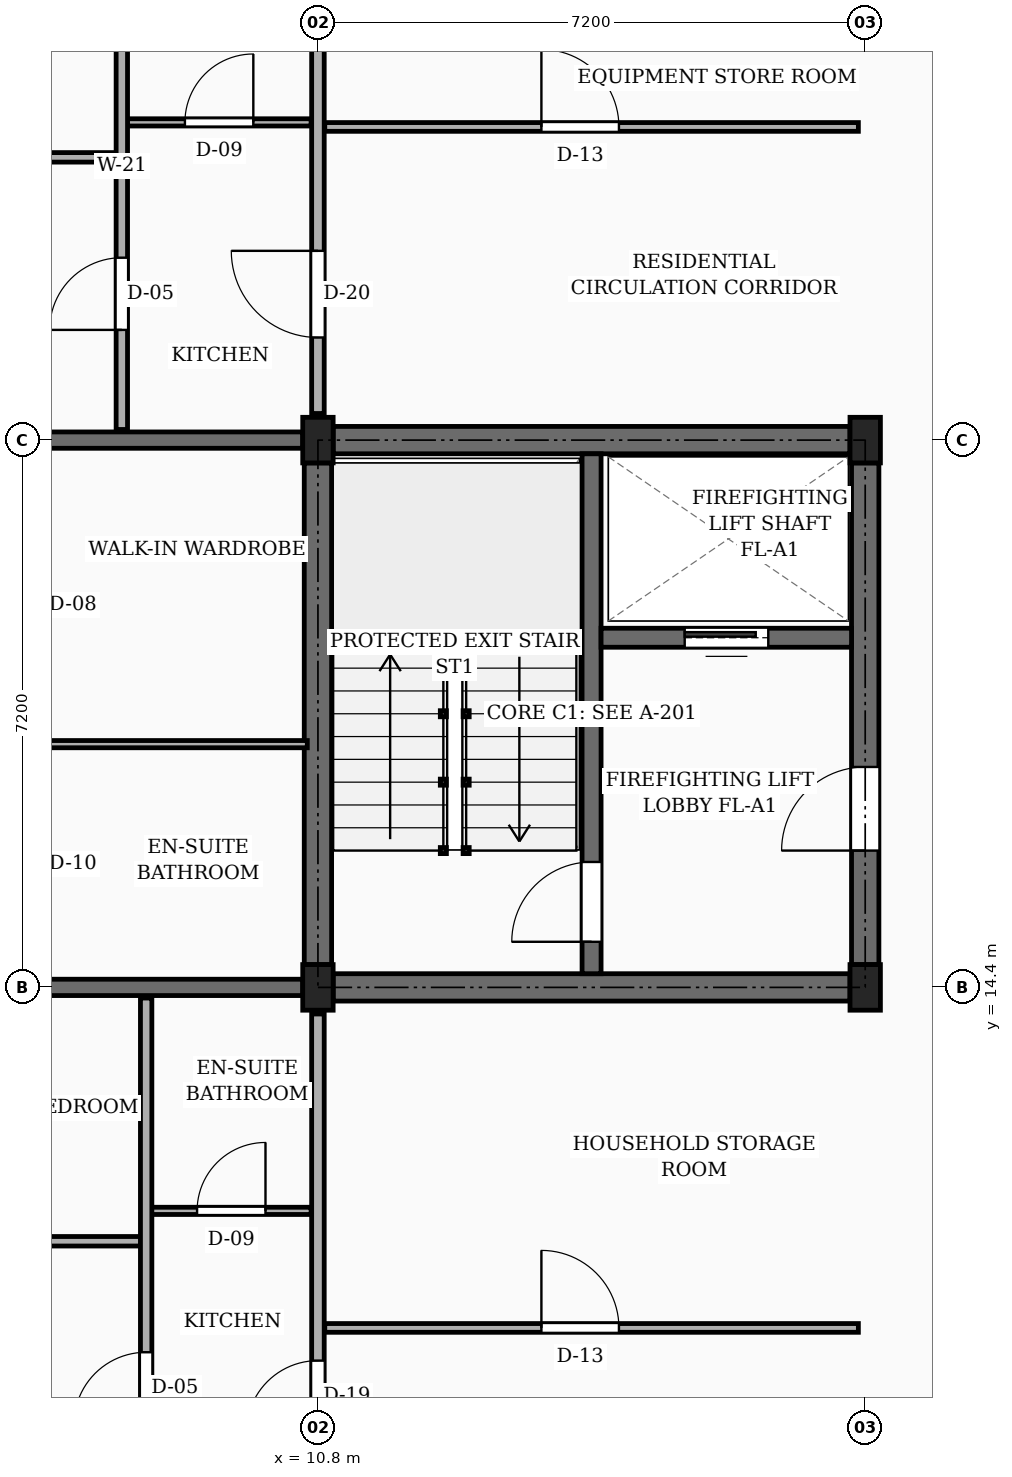
"""IFC4 building model, lengths in metres.
Left out: names, types, materials, properties, quantities, classifications, styles, units other than length and angle.
Written with IfcOpenShell. Run it as: python <this file> out.ifc"""

import sys

from ifc_helpers import new_model, si_unit, direction, frame, frame_2d, origin, origin_2d, place, context, subcontext, project, spatial, rectangle, extrude, element, fill, save


model = new_model("IFC4")
c1 = context("Model", 3, precision=1e-05, world=origin(), true_north=direction((0.0, 1.0)))
c2 = subcontext(c1, "Body", "Model", "MODEL_VIEW")
j1 = project(units=[si_unit("LENGTHUNIT", "METRE"), si_unit("PLANEANGLEUNIT", "RADIAN")], contexts=[c1])
p1 = place(None, origin())
s1 = spatial("IfcSite", under=j1, at=p1, CompositionType="ELEMENT")
p2 = place(p1, origin())
s2 = spatial("IfcBuilding", under=s1, at=p2, CompositionType="ELEMENT")
p3 = place(p2, frame((0.0, 0.0, 32.85)))
s3 = spatial("IfcBuildingStorey", under=s2, at=p3, CompositionType="ELEMENT", Elevation=32.85)
for number, where, z_axis, x_axis in (
    (1, (10.8, 14.4, 0.0), (0.0, 0.0, 1.0), (1.0, 0.0, 0.0)),
    (2, (10.8, 21.6, 0.0), (0.0, 0.0, 1.0), (1.0, 0.0, 0.0)),
    (3, (18.0, 14.4, 0.0), (0.0, 0.0, 1.0), (1.0, 0.0, 0.0)),
    (4, (18.0, 21.6, 0.0), (0.0, 0.0, 1.0), (1.0, 0.0, 0.0)),
):
    element("IfcColumn", number, at=place(p3, frame(where, z_axis=z_axis, x_axis=x_axis)), inside=s3, PredefinedType="COLUMN", context=c2, shape_type="SweptSolid", body=[
        extrude(rectangle(XDim=0.4, YDim=0.6, at=origin_2d()), origin(), (0.0, 0.0, 1.0), 3.15),
    ])
p4 = place(p3, frame((3.85, 14.4, 0.0), z_axis=(0.0, 0.0, 1.0), x_axis=(1.0, 0.0, 0.0)))
e5 = element("IfcWall", 5, at=p4, inside=s3, PredefinedType="SOLIDWALL", context=c2, shape_type="SweptSolid", body=[
    extrude(rectangle(XDim=6.75, YDim=0.215, at=frame_2d((3.375, 0.0))), origin(), (0.0, 0.0, 1.0), 2.17),
])
p5 = place(p4, frame((1.35, 0.0, 0.0)))
e6 = element("IfcOpeningElement", 6, at=p5, cuts=e5, PredefinedType="OPENING", context=c2, shape_type="SweptSolid", body=[
    extrude(rectangle(XDim=0.98, YDim=2.12, at=frame_2d((0.49, 1.06))), frame((0.0, 0.118, 0.0), z_axis=(0.0, -1.0, 0.0), x_axis=(1.0, 0.0, 0.0)), (0.0, 0.0, 1.0), 0.235),
])
p6 = place(p3, frame((3.85, 21.6, 0.0), z_axis=(0.0, 0.0, 1.0), x_axis=(1.0, 0.0, 0.0)))
e7 = element("IfcWall", 7, at=p6, inside=s3, PredefinedType="SOLIDWALL", context=c2, shape_type="SweptSolid", body=[
    extrude(rectangle(XDim=6.75, YDim=0.215, at=frame_2d((3.375, 0.0))), origin(), (0.0, 0.0, 1.0), 2.17),
])
p7 = place(p3, frame((10.8, 14.7, 0.0), z_axis=(0.0, 0.0, 1.0), x_axis=(0.0, 1.0, 0.0)))
e8 = element("IfcWall", 8, at=p7, inside=s3, PredefinedType="SHEAR", context=c2, shape_type="SweptSolid", body=[
    extrude(rectangle(XDim=6.6, YDim=0.36, at=frame_2d((3.3, 0.0))), origin(), (0.0, 0.0, 1.0), 2.87),
])
p8 = place(p3, frame((11.0, 21.6, 0.0), z_axis=(0.0, 0.0, 1.0), x_axis=(1.0, 0.0, 0.0)))
e9 = element("IfcWall", 9, at=p8, inside=s3, PredefinedType="SHEAR", context=c2, shape_type="SweptSolid", body=[
    extrude(rectangle(XDim=6.8, YDim=0.36, at=frame_2d((3.4, 0.0))), origin(), (0.0, 0.0, 1.0), 2.87),
])
p9 = place(p3, frame((18.0, 14.7, 0.0), z_axis=(0.0, 0.0, 1.0), x_axis=(0.0, 1.0, 0.0)))
e10 = element("IfcWall", 10, at=p9, inside=s3, PredefinedType="SHEAR", context=c2, shape_type="SweptSolid", body=[
    extrude(rectangle(XDim=6.6, YDim=0.36, at=frame_2d((3.3, 0.0))), origin(), (0.0, 0.0, 1.0), 2.87),
])
p10 = place(p9, frame((1.5, 0.0, 0.0)))
e11 = element("IfcOpeningElement", 11, at=p10, cuts=e10, PredefinedType="OPENING", context=c2, shape_type="SweptSolid", body=[
    extrude(rectangle(XDim=1.1, YDim=2.15, at=frame_2d((0.55, 1.075))), frame((0.0, 0.19, 0.0), z_axis=(0.0, -1.0, 0.0), x_axis=(1.0, 0.0, 0.0)), (0.0, 0.0, 1.0), 0.38),
])
p11 = place(p3, frame((11.0, 14.4, 0.0), z_axis=(0.0, 0.0, 1.0), x_axis=(1.0, 0.0, 0.0)))
e12 = element("IfcWall", 12, at=p11, inside=s3, PredefinedType="SHEAR", context=c2, shape_type="SweptSolid", body=[
    extrude(rectangle(XDim=6.8, YDim=0.36, at=frame_2d((3.4, 0.0))), origin(), (0.0, 0.0, 1.0), 2.87),
])
p12 = place(p3, frame((14.4, 14.58, 0.0), z_axis=(0.0, 0.0, 1.0), x_axis=(0.0, 1.0, 0.0)))
e13 = element("IfcWall", 13, at=p12, inside=s3, PredefinedType="SHEAR", context=c2, shape_type="SweptSolid", body=[
    extrude(rectangle(XDim=6.84, YDim=0.25, at=frame_2d((3.42, 0.0))), origin(), (0.0, 0.0, 1.0), 2.87),
])
p13 = place(p12, frame((0.42, 0.0, 0.0)))
e14 = element("IfcOpeningElement", 14, at=p13, cuts=e13, PredefinedType="OPENING", context=c2, shape_type="SweptSolid", body=[
    extrude(rectangle(XDim=1.05, YDim=2.15, at=frame_2d((0.525, 1.075))), frame((0.0, 0.135, 0.0), z_axis=(0.0, -1.0, 0.0), x_axis=(1.0, 0.0, 0.0)), (0.0, 0.0, 1.0), 0.27),
])
p14 = place(p3, frame((14.525, 19.0, 0.0), z_axis=(0.0, 0.0, 1.0), x_axis=(1.0, 0.0, 0.0)))
e15 = element("IfcWall", 15, at=p14, inside=s3, PredefinedType="SHEAR", context=c2, shape_type="SweptSolid", body=[
    extrude(rectangle(XDim=3.295, YDim=0.25, at=frame_2d((1.647, 0.0))), origin(), (0.0, 0.0, 1.0), 2.87),
])
p15 = place(p14, frame((1.1, 0.0, 0.0)))
e16 = element("IfcOpeningElement", 16, at=p15, cuts=e15, PredefinedType="OPENING", context=c2, shape_type="SweptSolid", body=[
    extrude(rectangle(XDim=1.1, YDim=2.2, at=frame_2d((0.55, 1.1))), frame((0.0, 0.135, 0.0), z_axis=(0.0, -1.0, 0.0), x_axis=(1.0, 0.0, 0.0)), (0.0, 0.0, 1.0), 0.27),
])
p16 = place(p3, frame((10.8, 7.55, 0.0), z_axis=(0.0, 0.0, 1.0), x_axis=(0.0, 1.0, 0.0)))
e17 = element("IfcWall", 17, at=p16, inside=s3, PredefinedType="PARTITIONING", context=c2, shape_type="SweptSolid", body=[
    extrude(rectangle(XDim=6.5, YDim=0.165, at=frame_2d((3.25, 0.0))), origin(), (0.0, 0.0, 1.0), 2.305),
])
p17 = place(p16, frame((1.0, 0.0, 0.0)))
e18 = element("IfcOpeningElement", 18, at=p17, cuts=e17, PredefinedType="OPENING", context=c2, shape_type="SweptSolid", body=[
    extrude(rectangle(XDim=0.94, YDim=2.12, at=frame_2d((0.47, 1.06))), frame((0.0, 0.093, 0.0), z_axis=(0.0, -1.0, 0.0), x_axis=(1.0, 0.0, 0.0)), (0.0, 0.0, 1.0), 0.185),
])
p18 = place(p3, frame((10.8, 21.95, 0.0), z_axis=(0.0, 0.0, 1.0), x_axis=(0.0, 1.0, 0.0)))
e19 = element("IfcWall", 19, at=p18, inside=s3, PredefinedType="PARTITIONING", context=c2, shape_type="SweptSolid", body=[
    extrude(rectangle(XDim=6.5, YDim=0.165, at=frame_2d((3.25, 0.0))), origin(), (0.0, 0.0, 1.0), 2.305),
])
p19 = place(p18, frame((1.0, 0.0, 0.0)))
e20 = element("IfcOpeningElement", 20, at=p19, cuts=e19, PredefinedType="OPENING", context=c2, shape_type="SweptSolid", body=[
    extrude(rectangle(XDim=1.14, YDim=2.18, at=frame_2d((0.57, 1.09))), frame((0.0, 0.093, 0.0), z_axis=(0.0, -1.0, 0.0), x_axis=(1.0, 0.0, 0.0)), (0.0, 0.0, 1.0), 0.185),
])
p20 = place(p3, frame((10.89, 9.92, 0.0), z_axis=(0.0, 0.0, 1.0), x_axis=(1.0, 0.0, 0.0)))
e21 = element("IfcWall", 21, at=p20, inside=s3, PredefinedType="PARTITIONING", context=c2, shape_type="SweptSolid", body=[
    extrude(rectangle(XDim=7.02, YDim=0.115, at=frame_2d((3.51, 0.0))), origin(), (0.0, 0.0, 1.0), 2.305),
])
p21 = place(p20, frame((2.85, 0.0, 0.0)))
e22 = element("IfcOpeningElement", 22, at=p21, cuts=e21, PredefinedType="OPENING", context=c2, shape_type="SweptSolid", body=[
    extrude(rectangle(XDim=1.02, YDim=2.15, at=frame_2d((0.51, 1.075))), frame((0.0, 0.067, 0.0), z_axis=(0.0, -1.0, 0.0), x_axis=(1.0, 0.0, 0.0)), (0.0, 0.0, 1.0), 0.135),
])
p22 = place(p3, frame((3.775, 11.06, 0.0), z_axis=(0.0, 0.0, 1.0), x_axis=(1.0, 0.0, 0.0)))
e23 = element("IfcWall", 23, at=p22, inside=s3, PredefinedType="PARTITIONING", context=c2, shape_type="SweptSolid", body=[
    extrude(rectangle(XDim=4.695, YDim=0.125, at=frame_2d((2.348, 0.0))), origin(), (0.0, 0.0, 1.0), 2.305),
])
p23 = place(p22, frame((1.897, 0.0, 0.0)))
e24 = element("IfcOpeningElement", 24, at=p23, cuts=e23, PredefinedType="OPENING", context=c2, shape_type="SweptSolid", body=[
    extrude(rectangle(XDim=0.9, YDim=2.1, at=frame_2d((0.45, 1.05))), frame((0.0, 0.073, 0.0), z_axis=(0.0, -1.0, 0.0), x_axis=(1.0, 0.0, 0.0)), (0.0, 0.0, 1.0), 0.145),
])
p24 = place(p3, frame((8.61, 11.46, 0.0), z_axis=(0.0, 0.0, 1.0), x_axis=(1.0, 0.0, 0.0)))
e25 = element("IfcWall", 25, at=p24, inside=s3, PredefinedType="PARTITIONING", context=c2, shape_type="SweptSolid", body=[
    extrude(rectangle(XDim=2.1, YDim=0.095, at=frame_2d((1.05, 0.0))), origin(), (0.0, 0.0, 1.0), 2.305),
])
p25 = place(p24, frame((0.6, 0.0, 0.0)))
e26 = element("IfcOpeningElement", 26, at=p25, cuts=e25, PredefinedType="OPENING", context=c2, shape_type="SweptSolid", body=[
    extrude(rectangle(XDim=0.9, YDim=2.05, at=frame_2d((0.45, 1.025))), frame((0.0, 0.058, 0.0), z_axis=(0.0, -1.0, 0.0), x_axis=(1.0, 0.0, 0.0)), (0.0, 0.0, 1.0), 0.115),
])
p26 = place(p3, frame((8.54, 7.375, 0.0), z_axis=(0.0, 0.0, 1.0), x_axis=(0.0, 1.0, 0.0)))
e27 = element("IfcWall", 27, at=p26, inside=s3, PredefinedType="PARTITIONING", context=c2, shape_type="SweptSolid", body=[
    extrude(rectangle(XDim=6.885, YDim=0.15, at=frame_2d((3.442, 0.0))), origin(), (0.0, 0.0, 1.0), 2.305),
])
p27 = place(p26, frame((1.275, 0.0, 0.0)))
e28 = element("IfcOpeningElement", 28, at=p27, cuts=e27, PredefinedType="OPENING", context=c2, shape_type="SweptSolid", body=[
    extrude(rectangle(XDim=0.95, YDim=2.1, at=frame_2d((0.475, 1.05))), frame((0.0, 0.085, 0.0), z_axis=(0.0, -1.0, 0.0), x_axis=(1.0, 0.0, 0.0)), (0.0, 0.0, 1.0), 0.17),
])
p28 = place(p3, frame((7.27, 17.6, 0.0), z_axis=(0.0, 0.0, 1.0), x_axis=(1.0, 0.0, 0.0)))
e29 = element("IfcWall", 29, at=p28, inside=s3, PredefinedType="PARTITIONING", context=c2, shape_type="SweptSolid", body=[
    extrude(rectangle(XDim=3.39, YDim=0.095, at=frame_2d((1.695, 0.0))), origin(), (0.0, 0.0, 1.0), 2.305),
])
p29 = place(p3, frame((10.89, 25.72, 0.0), z_axis=(0.0, 0.0, 1.0), x_axis=(1.0, 0.0, 0.0)))
e30 = element("IfcWall", 30, at=p29, inside=s3, PredefinedType="PARTITIONING", context=c2, shape_type="SweptSolid", body=[
    extrude(rectangle(XDim=7.02, YDim=0.115, at=frame_2d((3.51, 0.0))), origin(), (0.0, 0.0, 1.0), 2.305),
])
p30 = place(p29, frame((2.85, 0.0, 0.0)))
e31 = element("IfcOpeningElement", 31, at=p30, cuts=e30, PredefinedType="OPENING", context=c2, shape_type="SweptSolid", body=[
    extrude(rectangle(XDim=1.02, YDim=2.15, at=frame_2d((0.51, 1.075))), frame((0.0, 0.067, 0.0), z_axis=(0.0, -1.0, 0.0), x_axis=(1.0, 0.0, 0.0)), (0.0, 0.0, 1.0), 0.135),
])
p31 = place(p3, frame((3.775, 25.32, 0.0), z_axis=(0.0, 0.0, 1.0), x_axis=(1.0, 0.0, 0.0)))
e32 = element("IfcWall", 32, at=p31, inside=s3, PredefinedType="PARTITIONING", context=c2, shape_type="SweptSolid", body=[
    extrude(rectangle(XDim=4.375, YDim=0.125, at=frame_2d((2.188, 0.0))), origin(), (0.0, 0.0, 1.0), 2.305),
])
p32 = place(p31, frame((1.738, 0.0, 0.0)))
e33 = element("IfcOpeningElement", 33, at=p32, cuts=e32, PredefinedType="OPENING", context=c2, shape_type="SweptSolid", body=[
    extrude(rectangle(XDim=0.9, YDim=2.1, at=frame_2d((0.45, 1.05))), frame((0.0, 0.073, 0.0), z_axis=(0.0, -1.0, 0.0), x_axis=(1.0, 0.0, 0.0)), (0.0, 0.0, 1.0), 0.145),
])
p33 = place(p3, frame((8.29, 25.78, 0.0), z_axis=(0.0, 0.0, 1.0), x_axis=(1.0, 0.0, 0.0)))
e34 = element("IfcWall", 34, at=p33, inside=s3, PredefinedType="PARTITIONING", context=c2, shape_type="SweptSolid", body=[
    extrude(rectangle(XDim=2.42, YDim=0.095, at=frame_2d((1.21, 0.0))), origin(), (0.0, 0.0, 1.0), 2.305),
])
p34 = place(p33, frame((0.76, 0.0, 0.0)))
e35 = element("IfcOpeningElement", 35, at=p34, cuts=e34, PredefinedType="OPENING", context=c2, shape_type="SweptSolid", body=[
    extrude(rectangle(XDim=0.9, YDim=2.05, at=frame_2d((0.45, 1.025))), frame((0.0, 0.058, 0.0), z_axis=(0.0, -1.0, 0.0), x_axis=(1.0, 0.0, 0.0)), (0.0, 0.0, 1.0), 0.115),
])
p35 = place(p3, frame((8.22, 21.74, 0.0), z_axis=(0.0, 0.0, 1.0), x_axis=(0.0, 1.0, 0.0)))
e36 = element("IfcWall", 36, at=p35, inside=s3, PredefinedType="PARTITIONING", context=c2, shape_type="SweptSolid", body=[
    extrude(rectangle(XDim=6.92, YDim=0.15, at=frame_2d((3.46, 0.0))), origin(), (0.0, 0.0, 1.0), 2.305),
])
p36 = place(p35, frame((1.31, 0.0, 0.0)))
e37 = element("IfcOpeningElement", 37, at=p36, cuts=e36, PredefinedType="OPENING", context=c2, shape_type="SweptSolid", body=[
    extrude(rectangle(XDim=0.95, YDim=2.1, at=frame_2d((0.475, 1.05))), frame((0.0, 0.085, 0.0), z_axis=(0.0, -1.0, 0.0), x_axis=(1.0, 0.0, 0.0)), (0.0, 0.0, 1.0), 0.17),
])
p37 = place(p10, frame((1.1, 0.0, 0.0), z_axis=(0.0, 0.0, 1.0), x_axis=(-1.0, 0.0, 0.0)))
e38 = element("IfcDoor", 38, at=p37, inside=s3, OperationType="SINGLE_SWING_LEFT", PredefinedType="DOOR", context=c2, shape_type="SweptSolid", body=[
    extrude(rectangle(XDim=1.1, YDim=2.15, at=frame_2d((0.55, 1.075))), frame((0.0, 0.025, 0.0), z_axis=(0.0, -1.0, 0.0), x_axis=(1.0, 0.0, 0.0)), (0.0, 0.0, 1.0), 0.05),
])
fill(e11, e38)
p38 = place(p13, origin())
e39 = element("IfcDoor", 39, at=p38, inside=s3, OperationType="SINGLE_SWING_LEFT", PredefinedType="DOOR", context=c2, shape_type="SweptSolid", body=[
    extrude(rectangle(XDim=1.05, YDim=2.15, at=frame_2d((0.525, 1.075))), frame((0.0, 0.025, 0.0), z_axis=(0.0, -1.0, 0.0), x_axis=(1.0, 0.0, 0.0)), (0.0, 0.0, 1.0), 0.05),
])
fill(e14, e39)
p39 = place(p15, origin())
e40 = element("IfcDoor", 40, at=p39, inside=s3, OperationType="SLIDING_TO_LEFT", PredefinedType="DOOR", context=c2, shape_type="SweptSolid", body=[
    extrude(rectangle(XDim=1.1, YDim=2.2, at=frame_2d((0.55, 1.1))), frame((0.0, 0.025, 0.0), z_axis=(0.0, -1.0, 0.0), x_axis=(1.0, 0.0, 0.0)), (0.0, 0.0, 1.0), 0.05),
])
fill(e16, e40)
p40 = place(p17, origin())
e41 = element("IfcDoor", 41, at=p40, inside=s3, OperationType="SINGLE_SWING_LEFT", PredefinedType="DOOR", context=c2, shape_type="SweptSolid", body=[
    extrude(rectangle(XDim=0.94, YDim=2.12, at=frame_2d((0.47, 1.06))), frame((0.0, 0.025, 0.0), z_axis=(0.0, -1.0, 0.0), x_axis=(1.0, 0.0, 0.0)), (0.0, 0.0, 1.0), 0.05),
])
fill(e18, e41)
p41 = place(p19, origin())
e42 = element("IfcDoor", 42, at=p41, inside=s3, OperationType="SINGLE_SWING_RIGHT", PredefinedType="DOOR", context=c2, shape_type="SweptSolid", body=[
    extrude(rectangle(XDim=1.14, YDim=2.18, at=frame_2d((0.57, 1.09))), frame((0.0, 0.025, 0.0), z_axis=(0.0, -1.0, 0.0), x_axis=(1.0, 0.0, 0.0)), (0.0, 0.0, 1.0), 0.05),
])
fill(e20, e42)
p42 = place(p21, origin())
e43 = element("IfcDoor", 43, at=p42, inside=s3, OperationType="SINGLE_SWING_LEFT", PredefinedType="DOOR", context=c2, shape_type="SweptSolid", body=[
    extrude(rectangle(XDim=1.02, YDim=2.15, at=frame_2d((0.51, 1.075))), frame((0.0, 0.025, 0.0), z_axis=(0.0, -1.0, 0.0), x_axis=(1.0, 0.0, 0.0)), (0.0, 0.0, 1.0), 0.05),
])
fill(e22, e43)
p43 = place(p25, origin())
e44 = element("IfcDoor", 44, at=p43, inside=s3, OperationType="SINGLE_SWING_RIGHT", PredefinedType="DOOR", context=c2, shape_type="SweptSolid", body=[
    extrude(rectangle(XDim=0.9, YDim=2.05, at=frame_2d((0.45, 1.025))), frame((0.0, 0.025, 0.0), z_axis=(0.0, -1.0, 0.0), x_axis=(1.0, 0.0, 0.0)), (0.0, 0.0, 1.0), 0.05),
])
fill(e26, e44)
p44 = place(p27, origin())
e45 = element("IfcDoor", 45, at=p44, inside=s3, OperationType="SINGLE_SWING_LEFT", PredefinedType="DOOR", context=c2, shape_type="SweptSolid", body=[
    extrude(rectangle(XDim=0.95, YDim=2.1, at=frame_2d((0.475, 1.05))), frame((0.0, 0.025, 0.0), z_axis=(0.0, -1.0, 0.0), x_axis=(1.0, 0.0, 0.0)), (0.0, 0.0, 1.0), 0.05),
])
fill(e28, e45)
p45 = place(p30, origin())
e46 = element("IfcDoor", 46, at=p45, inside=s3, OperationType="SINGLE_SWING_LEFT", PredefinedType="DOOR", context=c2, shape_type="SweptSolid", body=[
    extrude(rectangle(XDim=1.02, YDim=2.15, at=frame_2d((0.51, 1.075))), frame((0.0, 0.025, 0.0), z_axis=(0.0, -1.0, 0.0), x_axis=(1.0, 0.0, 0.0)), (0.0, 0.0, 1.0), 0.05),
])
fill(e31, e46)
p46 = place(p34, origin())
e47 = element("IfcDoor", 47, at=p46, inside=s3, OperationType="SINGLE_SWING_RIGHT", PredefinedType="DOOR", context=c2, shape_type="SweptSolid", body=[
    extrude(rectangle(XDim=0.9, YDim=2.05, at=frame_2d((0.45, 1.025))), frame((0.0, 0.025, 0.0), z_axis=(0.0, -1.0, 0.0), x_axis=(1.0, 0.0, 0.0)), (0.0, 0.0, 1.0), 0.05),
])
fill(e35, e47)
p47 = place(p36, origin())
e48 = element("IfcDoor", 48, at=p47, inside=s3, OperationType="SINGLE_SWING_LEFT", PredefinedType="DOOR", context=c2, shape_type="SweptSolid", body=[
    extrude(rectangle(XDim=0.95, YDim=2.1, at=frame_2d((0.475, 1.05))), frame((0.0, 0.025, 0.0), z_axis=(0.0, -1.0, 0.0), x_axis=(1.0, 0.0, 0.0)), (0.0, 0.0, 1.0), 0.05),
])
fill(e37, e48)
save(model, sys.argv[1])
